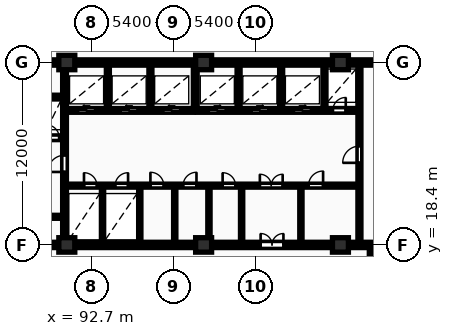
"""IFC4 building model, lengths in metres.
Left out: names, types, materials, properties, quantities, classifications, styles, units other than length and angle.
Written with IfcOpenShell. Run it as: python <this file> out.ifc"""

import sys

from ifc_helpers import new_model, si_unit, direction, frame, frame_2d, origin, origin_2d, place, context, subcontext, project, spatial, rectangle, extrude, element, fill, save


model = new_model("IFC4")
c1 = context("Model", 3, precision=1e-05, world=origin(), true_north=direction((0.0, 1.0)))
c2 = subcontext(c1, "Body", "Model", "MODEL_VIEW")
j1 = project(units=[si_unit("LENGTHUNIT", "METRE"), si_unit("PLANEANGLEUNIT", "RADIAN")], contexts=[c1])
p1 = place(None, origin())
s1 = spatial("IfcSite", under=j1, at=p1, CompositionType="ELEMENT")
p2 = place(p1, origin())
s2 = spatial("IfcBuilding", under=s1, at=p2, CompositionType="ELEMENT")
p3 = place(p2, origin())
s3 = spatial("IfcBuildingStorey", under=s2, at=p3, CompositionType="ELEMENT", Elevation=0.0)
for number, where, z_axis, x_axis in (
    (1, (91.1, 18.4, 0.0), (0.0, 0.0, 1.0), (1.0, 0.0, 0.0)),
    (2, (91.1, 30.4, 0.0), (0.0, 0.0, 1.0), (1.0, 0.0, 0.0)),
    (3, (100.1, 18.4, 0.0), (0.0, 0.0, 1.0), (1.0, 0.0, 0.0)),
    (4, (100.1, 30.4, 0.0), (0.0, 0.0, 1.0), (1.0, 0.0, 0.0)),
    (5, (109.1, 18.4, 0.0), (0.0, 0.0, 1.0), (1.0, 0.0, 0.0)),
    (6, (109.1, 30.4, 0.0), (0.0, 0.0, 1.0), (1.0, 0.0, 0.0)),
):
    element("IfcColumn", number, at=place(p3, frame(where, z_axis=z_axis, x_axis=x_axis)), inside=s3, PredefinedType="COLUMN", context=c2, shape_type="SweptSolid", body=[
        extrude(rectangle(XDim=1.05, YDim=0.95, at=origin_2d()), origin(), (0.0, 0.0, 1.0), 5.4),
    ])
p4 = place(p3, frame((81.925, 30.4, 0.0), z_axis=(0.0, 0.0, 1.0), x_axis=(1.0, 0.0, 0.0)))
e7 = element("IfcWall", 7, at=p4, inside=s3, PredefinedType="SHEAR", context=c2, shape_type="SweptSolid", body=[
    extrude(rectangle(XDim=36.265, YDim=0.35, at=frame_2d((18.132, 0.0))), origin(), (0.0, 0.0, 1.0), 5.4),
])
p5 = place(p3, frame((81.925, 18.4, 0.0), z_axis=(0.0, 0.0, 1.0), x_axis=(1.0, 0.0, 0.0)))
e8 = element("IfcWall", 8, at=p5, inside=s3, PredefinedType="SHEAR", context=c2, shape_type="SweptSolid", body=[
    extrude(rectangle(XDim=36.265, YDim=0.35, at=frame_2d((18.132, 0.0))), origin(), (0.0, 0.0, 1.0), 5.4),
])
p6 = place(p5, frame((5.675, 0.0, 0.0)))
e9 = element("IfcOpeningElement", 9, at=p6, cuts=e8, PredefinedType="OPENING", context=c2, shape_type="SweptSolid", body=[
    extrude(rectangle(XDim=1.0, YDim=2.15, at=frame_2d((0.5, 1.075))), frame((0.0, 0.185, 0.0), z_axis=(0.0, -1.0, 0.0), x_axis=(1.0, 0.0, 0.0)), (0.0, 0.0, 1.0), 0.37),
])
p7 = place(p5, frame((21.925, 0.0, 0.0)))
e10 = element("IfcOpeningElement", 10, at=p7, cuts=e8, PredefinedType="OPENING", context=c2, shape_type="SweptSolid", body=[
    extrude(rectangle(XDim=1.5, YDim=2.2, at=frame_2d((0.75, 1.1))), frame((0.0, 0.185, 0.0), z_axis=(0.0, -1.0, 0.0), x_axis=(1.0, 0.0, 0.0)), (0.0, 0.0, 1.0), 0.37),
])
p8 = place(p5, frame((29.875, 0.0, 0.0)))
e11 = element("IfcOpeningElement", 11, at=p8, cuts=e8, PredefinedType="OPENING", context=c2, shape_type="SweptSolid", body=[
    extrude(rectangle(XDim=1.0, YDim=2.15, at=frame_2d((0.5, 1.075))), frame((0.0, 0.185, 0.0), z_axis=(0.0, -1.0, 0.0), x_axis=(1.0, 0.0, 0.0)), (0.0, 0.0, 1.0), 0.37),
])
p9 = place(p3, frame((83.0, 28.125, 0.0), z_axis=(0.0, 0.0, 1.0), x_axis=(1.0, 0.0, 0.0)))
e12 = element("IfcWall", 12, at=p9, inside=s3, PredefinedType="SHEAR", context=c2, shape_type="SweptSolid", body=[
    extrude(rectangle(XDim=7.82, YDim=0.25, at=frame_2d((3.91, 0.0))), origin(), (0.0, 0.0, 1.0), 5.4),
])
p10 = place(p3, frame((86.5, 25.45, 0.0), z_axis=(0.0, 0.0, 1.0), x_axis=(1.0, 0.0, 0.0)))
e13 = element("IfcWall", 13, at=p10, inside=s3, PredefinedType="SHEAR", context=c2, shape_type="SweptSolid", body=[
    extrude(rectangle(XDim=4.32, YDim=0.25, at=frame_2d((2.16, 0.0))), origin(), (0.0, 0.0, 1.0), 5.4),
])
p11 = place(p10, frame((1.14, 0.0, 0.0)))
e14 = element("IfcOpeningElement", 14, at=p11, cuts=e13, PredefinedType="OPENING", context=c2, shape_type="SweptSolid", body=[
    extrude(rectangle(XDim=1.12, YDim=2.12, at=frame_2d((0.56, 1.06))), frame((0.0, 0.135, 0.0), z_axis=(0.0, -1.0, 0.0), x_axis=(1.0, 0.0, 0.0)), (0.0, 0.0, 1.0), 0.27),
])
p12 = place(p10, frame((3.25, 0.0, 0.0)))
e15 = element("IfcOpeningElement", 15, at=p12, cuts=e13, PredefinedType="OPENING", context=c2, shape_type="SweptSolid", body=[
    extrude(rectangle(XDim=0.85, YDim=2.05, at=frame_2d((0.425, 1.025))), frame((0.0, 0.135, 0.0), z_axis=(0.0, -1.0, 0.0), x_axis=(1.0, 0.0, 0.0)), (0.0, 0.0, 1.0), 0.27),
])
p13 = place(p3, frame((86.5, 20.25, 0.0), z_axis=(0.0, 0.0, 1.0), x_axis=(1.0, 0.0, 0.0)))
e16 = element("IfcWall", 16, at=p13, inside=s3, PredefinedType="PARTITIONING", context=c2, shape_type="SweptSolid", body=[
    extrude(rectangle(XDim=4.32, YDim=0.2, at=frame_2d((2.16, 0.0))), origin(), (0.0, 0.0, 1.0), 5.1),
])
p14 = place(p13, frame((1.4, 0.0, 0.0)))
e17 = element("IfcOpeningElement", 17, at=p14, cuts=e16, PredefinedType="OPENING", context=c2, shape_type="SweptSolid", body=[
    extrude(rectangle(XDim=1.1, YDim=2.1, at=frame_2d((0.55, 1.05))), frame((0.0, 0.11, 0.0), z_axis=(0.0, -1.0, 0.0), x_axis=(1.0, 0.0, 0.0)), (0.0, 0.0, 1.0), 0.22),
])
p15 = place(p3, frame((90.95, 18.6, 0.0), z_axis=(0.0, 0.0, 1.0), x_axis=(0.0, 1.0, 0.0)))
e18 = element("IfcWall", 18, at=p15, inside=s3, PredefinedType="SHEAR", context=c2, shape_type="SweptSolid", body=[
    extrude(rectangle(XDim=11.6, YDim=0.25, at=frame_2d((5.8, 0.0))), origin(), (0.0, 0.0, 1.0), 5.4),
])
p16 = place(p15, frame((4.6, 0.0, 0.0)))
e19 = element("IfcOpeningElement", 19, at=p16, cuts=e18, PredefinedType="OPENING", context=c2, shape_type="SweptSolid", body=[
    extrude(rectangle(XDim=1.1, YDim=2.1, at=frame_2d((0.55, 1.05))), frame((0.0, 0.135, 0.0), z_axis=(0.0, -1.0, 0.0), x_axis=(1.0, 0.0, 0.0)), (0.0, 0.0, 1.0), 0.27),
])
for number, where, z_axis, x_axis in (
    (20, (93.8, 27.38, 0.0), (0.0, 0.0, 1.0), (0.0, 1.0, 0.0)),
    (21, (96.6, 27.38, 0.0), (0.0, 0.0, 1.0), (0.0, 1.0, 0.0)),
):
    element("IfcWall", number, at=place(p3, frame(where, z_axis=z_axis, x_axis=x_axis)), inside=s3, PredefinedType="PARTITIONING", context=c2, shape_type="SweptSolid", body=[
        extrude(rectangle(XDim=2.82, YDim=0.2, at=frame_2d((1.41, 0.0))), origin(), (0.0, 0.0, 1.0), 5.1),
    ])
p17 = place(p3, frame((91.08, 27.25, 0.0), z_axis=(0.0, 0.0, 1.0), x_axis=(1.0, 0.0, 0.0)))
e22 = element("IfcWall", 22, at=p17, inside=s3, PredefinedType="SHEAR", context=c2, shape_type="SweptSolid", body=[
    extrude(rectangle(XDim=8.34, YDim=0.25, at=frame_2d((4.17, 0.0))), origin(), (0.0, 0.0, 1.0), 5.4),
])
p18 = place(p17, frame((0.76, 0.0, 0.0)))
e23 = element("IfcOpeningElement", 23, at=p18, cuts=e22, PredefinedType="OPENING", context=c2, shape_type="SweptSolid", body=[
    extrude(rectangle(XDim=1.12, YDim=2.12, at=frame_2d((0.56, 1.06))), frame((0.0, 0.135, 0.0), z_axis=(0.0, -1.0, 0.0), x_axis=(1.0, 0.0, 0.0)), (0.0, 0.0, 1.0), 0.27),
])
p19 = place(p17, frame((3.56, 0.0, 0.0)))
e24 = element("IfcOpeningElement", 24, at=p19, cuts=e22, PredefinedType="OPENING", context=c2, shape_type="SweptSolid", body=[
    extrude(rectangle(XDim=1.12, YDim=2.12, at=frame_2d((0.56, 1.06))), frame((0.0, 0.135, 0.0), z_axis=(0.0, -1.0, 0.0), x_axis=(1.0, 0.0, 0.0)), (0.0, 0.0, 1.0), 0.27),
])
p20 = place(p17, frame((6.36, 0.0, 0.0)))
e25 = element("IfcOpeningElement", 25, at=p20, cuts=e22, PredefinedType="OPENING", context=c2, shape_type="SweptSolid", body=[
    extrude(rectangle(XDim=1.12, YDim=2.12, at=frame_2d((0.56, 1.06))), frame((0.0, 0.135, 0.0), z_axis=(0.0, -1.0, 0.0), x_axis=(1.0, 0.0, 0.0)), (0.0, 0.0, 1.0), 0.27),
])
p21 = place(p3, frame((99.55, 27.25, 0.0), z_axis=(0.0, 0.0, 1.0), x_axis=(0.0, 1.0, 0.0)))
e26 = element("IfcWall", 26, at=p21, inside=s3, PredefinedType="SHEAR", context=c2, shape_type="SweptSolid", body=[
    extrude(rectangle(XDim=2.95, YDim=0.25, at=frame_2d((1.475, 0.0))), origin(), (0.0, 0.0, 1.0), 5.4),
])
for number, where, z_axis, x_axis in (
    (27, (102.4, 27.38, 0.0), (0.0, 0.0, 1.0), (0.0, 1.0, 0.0)),
    (28, (105.2, 27.38, 0.0), (0.0, 0.0, 1.0), (0.0, 1.0, 0.0)),
    (29, (108.05, 27.38, 0.0), (0.0, 0.0, 1.0), (0.0, 1.0, 0.0)),
):
    element("IfcWall", number, at=place(p3, frame(where, z_axis=z_axis, x_axis=x_axis)), inside=s3, PredefinedType="PARTITIONING", context=c2, shape_type="SweptSolid", body=[
        extrude(rectangle(XDim=2.82, YDim=0.2, at=frame_2d((1.41, 0.0))), origin(), (0.0, 0.0, 1.0), 5.1),
    ])
p22 = place(p3, frame((99.68, 27.25, 0.0), z_axis=(0.0, 0.0, 1.0), x_axis=(1.0, 0.0, 0.0)))
e30 = element("IfcWall", 30, at=p22, inside=s3, PredefinedType="SHEAR", context=c2, shape_type="SweptSolid", body=[
    extrude(rectangle(XDim=10.54, YDim=0.25, at=frame_2d((5.27, 0.0))), origin(), (0.0, 0.0, 1.0), 5.4),
])
p23 = place(p22, frame((0.76, 0.0, 0.0)))
e31 = element("IfcOpeningElement", 31, at=p23, cuts=e30, PredefinedType="OPENING", context=c2, shape_type="SweptSolid", body=[
    extrude(rectangle(XDim=1.12, YDim=2.12, at=frame_2d((0.56, 1.06))), frame((0.0, 0.135, 0.0), z_axis=(0.0, -1.0, 0.0), x_axis=(1.0, 0.0, 0.0)), (0.0, 0.0, 1.0), 0.27),
])
p24 = place(p22, frame((3.56, 0.0, 0.0)))
e32 = element("IfcOpeningElement", 32, at=p24, cuts=e30, PredefinedType="OPENING", context=c2, shape_type="SweptSolid", body=[
    extrude(rectangle(XDim=1.12, YDim=2.12, at=frame_2d((0.56, 1.06))), frame((0.0, 0.135, 0.0), z_axis=(0.0, -1.0, 0.0), x_axis=(1.0, 0.0, 0.0)), (0.0, 0.0, 1.0), 0.27),
])
p25 = place(p22, frame((6.36, 0.0, 0.0)))
e33 = element("IfcOpeningElement", 33, at=p25, cuts=e30, PredefinedType="OPENING", context=c2, shape_type="SweptSolid", body=[
    extrude(rectangle(XDim=1.12, YDim=2.12, at=frame_2d((0.56, 1.06))), frame((0.0, 0.135, 0.0), z_axis=(0.0, -1.0, 0.0), x_axis=(1.0, 0.0, 0.0)), (0.0, 0.0, 1.0), 0.27),
])
p26 = place(p22, frame((8.92, 0.0, 0.0)))
e34 = element("IfcOpeningElement", 34, at=p26, cuts=e30, PredefinedType="OPENING", context=c2, shape_type="SweptSolid", body=[
    extrude(rectangle(XDim=0.85, YDim=2.05, at=frame_2d((0.425, 1.025))), frame((0.0, 0.135, 0.0), z_axis=(0.0, -1.0, 0.0), x_axis=(1.0, 0.0, 0.0)), (0.0, 0.0, 1.0), 0.27),
])
for number, where, z_axis, x_axis in (
    (35, (93.45, 18.6, 0.0), (0.0, 0.0, 1.0), (0.0, 1.0, 0.0)),
    (36, (95.9, 18.6, 0.0), (0.0, 0.0, 1.0), (0.0, 1.0, 0.0)),
    (37, (98.2, 18.6, 0.0), (0.0, 0.0, 1.0), (0.0, 1.0, 0.0)),
):
    element("IfcWall", number, at=place(p3, frame(where, z_axis=z_axis, x_axis=x_axis)), inside=s3, PredefinedType="PARTITIONING", context=c2, shape_type="SweptSolid", body=[
        extrude(rectangle(XDim=3.6, YDim=0.15, at=frame_2d((1.8, 0.0))), origin(), (0.0, 0.0, 1.0), 5.1),
    ])
p27 = place(p3, frame((100.45, 18.6, 0.0), z_axis=(0.0, 0.0, 1.0), x_axis=(0.0, 1.0, 0.0)))
e38 = element("IfcWall", 38, at=p27, inside=s3, PredefinedType="PARTITIONING", context=c2, shape_type="SweptSolid", body=[
    extrude(rectangle(XDim=3.6, YDim=0.15, at=frame_2d((1.8, 0.0))), origin(), (0.0, 0.0, 1.0), 4.35),
])
for number, where, z_axis, x_axis in (
    (39, (102.6, 18.6, 0.0), (0.0, 0.0, 1.0), (0.0, 1.0, 0.0)),
    (40, (106.5, 18.6, 0.0), (0.0, 0.0, 1.0), (0.0, 1.0, 0.0)),
):
    element("IfcWall", number, at=place(p3, frame(where, z_axis=z_axis, x_axis=x_axis)), inside=s3, PredefinedType="PARTITIONING", context=c2, shape_type="SweptSolid", body=[
        extrude(rectangle(XDim=3.6, YDim=0.15, at=frame_2d((1.8, 0.0))), origin(), (0.0, 0.0, 1.0), 5.1),
    ])
p28 = place(p3, frame((91.08, 22.3, 0.0), z_axis=(0.0, 0.0, 1.0), x_axis=(1.0, 0.0, 0.0)))
e41 = element("IfcWall", 41, at=p28, inside=s3, PredefinedType="PARTITIONING", context=c2, shape_type="SweptSolid", body=[
    extrude(rectangle(XDim=19.14, YDim=0.2, at=frame_2d((9.57, 0.0))), origin(), (0.0, 0.0, 1.0), 5.1),
])
p29 = place(p28, frame((1.15, 0.0, 0.0)))
e42 = element("IfcOpeningElement", 42, at=p29, cuts=e41, PredefinedType="OPENING", context=c2, shape_type="SweptSolid", body=[
    extrude(rectangle(XDim=0.85, YDim=2.05, at=frame_2d((0.425, 1.025))), frame((0.0, 0.11, 0.0), z_axis=(0.0, -1.0, 0.0), x_axis=(1.0, 0.0, 0.0)), (0.0, 0.0, 1.0), 0.22),
])
p30 = place(p28, frame((3.2, 0.0, 0.0)))
e43 = element("IfcOpeningElement", 43, at=p30, cuts=e41, PredefinedType="OPENING", context=c2, shape_type="SweptSolid", body=[
    extrude(rectangle(XDim=0.85, YDim=2.05, at=frame_2d((0.425, 1.025))), frame((0.0, 0.11, 0.0), z_axis=(0.0, -1.0, 0.0), x_axis=(1.0, 0.0, 0.0)), (0.0, 0.0, 1.0), 0.22),
])
p31 = place(p28, frame((12.72, 0.0, 0.0)))
e44 = element("IfcOpeningElement", 44, at=p31, cuts=e41, PredefinedType="OPENING", context=c2, shape_type="SweptSolid", body=[
    extrude(rectangle(XDim=1.5, YDim=2.2, at=frame_2d((0.75, 1.1))), frame((0.0, 0.11, 0.0), z_axis=(0.0, -1.0, 0.0), x_axis=(1.0, 0.0, 0.0)), (0.0, 0.0, 1.0), 0.22),
])
p32 = place(p28, frame((5.52, 0.0, 0.0)))
e45 = element("IfcOpeningElement", 45, at=p32, cuts=e41, PredefinedType="OPENING", context=c2, shape_type="SweptSolid", body=[
    extrude(rectangle(XDim=0.88, YDim=2.06, at=frame_2d((0.44, 1.03))), frame((0.0, 0.11, 0.0), z_axis=(0.0, -1.0, 0.0), x_axis=(1.0, 0.0, 0.0)), (0.0, 0.0, 1.0), 0.22),
])
p33 = place(p28, frame((7.67, 0.0, 0.0)))
e46 = element("IfcOpeningElement", 46, at=p33, cuts=e41, PredefinedType="OPENING", context=c2, shape_type="SweptSolid", body=[
    extrude(rectangle(XDim=0.88, YDim=2.06, at=frame_2d((0.44, 1.03))), frame((0.0, 0.11, 0.0), z_axis=(0.0, -1.0, 0.0), x_axis=(1.0, 0.0, 0.0)), (0.0, 0.0, 1.0), 0.22),
])
p34 = place(p28, frame((10.27, 0.0, 0.0)))
e47 = element("IfcOpeningElement", 47, at=p34, cuts=e41, PredefinedType="OPENING", context=c2, shape_type="SweptSolid", body=[
    extrude(rectangle(XDim=0.85, YDim=2.05, at=frame_2d((0.425, 1.025))), frame((0.0, 0.11, 0.0), z_axis=(0.0, -1.0, 0.0), x_axis=(1.0, 0.0, 0.0)), (0.0, 0.0, 1.0), 0.22),
])
p35 = place(p28, frame((15.92, 0.0, 0.0)))
e48 = element("IfcOpeningElement", 48, at=p35, cuts=e41, PredefinedType="OPENING", context=c2, shape_type="SweptSolid", body=[
    extrude(rectangle(XDim=0.96, YDim=2.1, at=frame_2d((0.48, 1.05))), frame((0.0, 0.11, 0.0), z_axis=(0.0, -1.0, 0.0), x_axis=(1.0, 0.0, 0.0)), (0.0, 0.0, 1.0), 0.22),
])
p36 = place(p3, frame((110.35, 18.6, 0.0), z_axis=(0.0, 0.0, 1.0), x_axis=(0.0, 1.0, 0.0)))
e49 = element("IfcWall", 49, at=p36, inside=s3, PredefinedType="PARTITIONING", context=c2, shape_type="SweptSolid", body=[
    extrude(rectangle(XDim=11.6, YDim=0.2, at=frame_2d((5.8, 0.0))), origin(), (0.0, 0.0, 1.0), 5.1),
])
p37 = place(p36, frame((5.2, 0.0, 0.0)))
e50 = element("IfcOpeningElement", 50, at=p37, cuts=e49, PredefinedType="OPENING", context=c2, shape_type="SweptSolid", body=[
    extrude(rectangle(XDim=1.1, YDim=2.15, at=frame_2d((0.55, 1.075))), frame((0.0, 0.11, 0.0), z_axis=(0.0, -1.0, 0.0), x_axis=(1.0, 0.0, 0.0)), (0.0, 0.0, 1.0), 0.22),
])
p38 = place(p3, frame((111.1, -26.2, 0.0), z_axis=(0.0, 0.0, 1.0), x_axis=(0.0, 1.0, 0.0)))
e51 = element("IfcWall", 51, at=p38, inside=s3, PredefinedType="PARTITIONING", context=c2, shape_type="SweptSolid", body=[
    extrude(rectangle(XDim=44.35, YDim=0.2, at=frame_2d((22.175, 0.0))), origin(), (0.0, 0.0, 1.0), 5.1),
])
p39 = place(p38, frame((16.0, 0.0, 0.0)))
e52 = element("IfcOpeningElement", 52, at=p39, cuts=e51, PredefinedType="OPENING", context=c2, shape_type="SweptSolid", body=[
    extrude(rectangle(XDim=1.1, YDim=2.1, at=frame_2d((0.55, 1.05))), frame((0.0, 0.11, 0.0), z_axis=(0.0, -1.0, 0.0), x_axis=(1.0, 0.0, 0.0)), (0.0, 0.0, 1.0), 0.22),
])
p40 = place(p7, origin())
e53 = element("IfcDoor", 53, at=p40, inside=s3, OperationType="DOUBLE_DOOR_SINGLE_SWING", PredefinedType="DOOR", context=c2, shape_type="SweptSolid", body=[
    extrude(rectangle(XDim=1.5, YDim=2.2, at=frame_2d((0.75, 1.1))), frame((0.0, 0.025, 0.0), z_axis=(0.0, -1.0, 0.0), x_axis=(1.0, 0.0, 0.0)), (0.0, 0.0, 1.0), 0.05),
])
fill(e10, e53)
p41 = place(p12, origin())
e54 = element("IfcDoor", 54, at=p41, inside=s3, OperationType="SINGLE_SWING_LEFT", PredefinedType="DOOR", context=c2, shape_type="SweptSolid", body=[
    extrude(rectangle(XDim=0.85, YDim=2.05, at=frame_2d((0.425, 1.025))), frame((0.0, 0.025, 0.0), z_axis=(0.0, -1.0, 0.0), x_axis=(1.0, 0.0, 0.0)), (0.0, 0.0, 1.0), 0.05),
])
fill(e15, e54)
p42 = place(p16, origin())
e55 = element("IfcDoor", 55, at=p42, inside=s3, OperationType="SINGLE_SWING_LEFT", PredefinedType="DOOR", context=c2, shape_type="SweptSolid", body=[
    extrude(rectangle(XDim=1.1, YDim=2.1, at=frame_2d((0.55, 1.05))), frame((0.0, 0.025, 0.0), z_axis=(0.0, -1.0, 0.0), x_axis=(1.0, 0.0, 0.0)), (0.0, 0.0, 1.0), 0.05),
])
fill(e19, e55)
p43 = place(p18, origin())
e56 = element("IfcDoor", 56, at=p43, inside=s3, OperationType="SLIDING_TO_LEFT", PredefinedType="DOOR", context=c2, shape_type="SweptSolid", body=[
    extrude(rectangle(XDim=1.12, YDim=2.12, at=frame_2d((0.56, 1.06))), frame((0.0, 0.025, 0.0), z_axis=(0.0, -1.0, 0.0), x_axis=(1.0, 0.0, 0.0)), (0.0, 0.0, 1.0), 0.05),
])
fill(e23, e56)
p44 = place(p19, origin())
e57 = element("IfcDoor", 57, at=p44, inside=s3, OperationType="SLIDING_TO_LEFT", PredefinedType="DOOR", context=c2, shape_type="SweptSolid", body=[
    extrude(rectangle(XDim=1.12, YDim=2.12, at=frame_2d((0.56, 1.06))), frame((0.0, 0.025, 0.0), z_axis=(0.0, -1.0, 0.0), x_axis=(1.0, 0.0, 0.0)), (0.0, 0.0, 1.0), 0.05),
])
fill(e24, e57)
p45 = place(p20, origin())
e58 = element("IfcDoor", 58, at=p45, inside=s3, OperationType="SLIDING_TO_LEFT", PredefinedType="DOOR", context=c2, shape_type="SweptSolid", body=[
    extrude(rectangle(XDim=1.12, YDim=2.12, at=frame_2d((0.56, 1.06))), frame((0.0, 0.025, 0.0), z_axis=(0.0, -1.0, 0.0), x_axis=(1.0, 0.0, 0.0)), (0.0, 0.0, 1.0), 0.05),
])
fill(e25, e58)
p46 = place(p23, origin())
e59 = element("IfcDoor", 59, at=p46, inside=s3, OperationType="SLIDING_TO_RIGHT", PredefinedType="DOOR", context=c2, shape_type="SweptSolid", body=[
    extrude(rectangle(XDim=1.12, YDim=2.12, at=frame_2d((0.56, 1.06))), frame((0.0, 0.025, 0.0), z_axis=(0.0, -1.0, 0.0), x_axis=(1.0, 0.0, 0.0)), (0.0, 0.0, 1.0), 0.05),
])
fill(e31, e59)
p47 = place(p24, origin())
e60 = element("IfcDoor", 60, at=p47, inside=s3, OperationType="SLIDING_TO_RIGHT", PredefinedType="DOOR", context=c2, shape_type="SweptSolid", body=[
    extrude(rectangle(XDim=1.12, YDim=2.12, at=frame_2d((0.56, 1.06))), frame((0.0, 0.025, 0.0), z_axis=(0.0, -1.0, 0.0), x_axis=(1.0, 0.0, 0.0)), (0.0, 0.0, 1.0), 0.05),
])
fill(e32, e60)
p48 = place(p25, origin())
e61 = element("IfcDoor", 61, at=p48, inside=s3, OperationType="SLIDING_TO_RIGHT", PredefinedType="DOOR", context=c2, shape_type="SweptSolid", body=[
    extrude(rectangle(XDim=1.12, YDim=2.12, at=frame_2d((0.56, 1.06))), frame((0.0, 0.025, 0.0), z_axis=(0.0, -1.0, 0.0), x_axis=(1.0, 0.0, 0.0)), (0.0, 0.0, 1.0), 0.05),
])
fill(e33, e61)
p49 = place(p26, origin())
e62 = element("IfcDoor", 62, at=p49, inside=s3, OperationType="SINGLE_SWING_RIGHT", PredefinedType="DOOR", context=c2, shape_type="SweptSolid", body=[
    extrude(rectangle(XDim=0.85, YDim=2.05, at=frame_2d((0.425, 1.025))), frame((0.0, 0.025, 0.0), z_axis=(0.0, -1.0, 0.0), x_axis=(1.0, 0.0, 0.0)), (0.0, 0.0, 1.0), 0.05),
])
fill(e34, e62)
p50 = place(p29, origin())
e63 = element("IfcDoor", 63, at=p50, inside=s3, OperationType="SINGLE_SWING_LEFT", PredefinedType="DOOR", context=c2, shape_type="SweptSolid", body=[
    extrude(rectangle(XDim=0.85, YDim=2.05, at=frame_2d((0.425, 1.025))), frame((0.0, 0.025, 0.0), z_axis=(0.0, -1.0, 0.0), x_axis=(1.0, 0.0, 0.0)), (0.0, 0.0, 1.0), 0.05),
])
fill(e42, e63)
p51 = place(p30, origin())
e64 = element("IfcDoor", 64, at=p51, inside=s3, OperationType="SINGLE_SWING_RIGHT", PredefinedType="DOOR", context=c2, shape_type="SweptSolid", body=[
    extrude(rectangle(XDim=0.85, YDim=2.05, at=frame_2d((0.425, 1.025))), frame((0.0, 0.025, 0.0), z_axis=(0.0, -1.0, 0.0), x_axis=(1.0, 0.0, 0.0)), (0.0, 0.0, 1.0), 0.05),
])
fill(e43, e64)
p52 = place(p31, origin())
e65 = element("IfcDoor", 65, at=p52, inside=s3, OperationType="DOUBLE_DOOR_SINGLE_SWING", PredefinedType="DOOR", context=c2, shape_type="SweptSolid", body=[
    extrude(rectangle(XDim=1.5, YDim=2.2, at=frame_2d((0.75, 1.1))), frame((0.0, 0.025, 0.0), z_axis=(0.0, -1.0, 0.0), x_axis=(1.0, 0.0, 0.0)), (0.0, 0.0, 1.0), 0.05),
])
fill(e44, e65)
p53 = place(p32, origin())
e66 = element("IfcDoor", 66, at=p53, inside=s3, OperationType="SINGLE_SWING_LEFT", PredefinedType="DOOR", context=c2, shape_type="SweptSolid", body=[
    extrude(rectangle(XDim=0.88, YDim=2.06, at=frame_2d((0.44, 1.03))), frame((0.0, 0.025, 0.0), z_axis=(0.0, -1.0, 0.0), x_axis=(1.0, 0.0, 0.0)), (0.0, 0.0, 1.0), 0.05),
])
fill(e45, e66)
p54 = place(p33, origin())
e67 = element("IfcDoor", 67, at=p54, inside=s3, OperationType="SINGLE_SWING_RIGHT", PredefinedType="DOOR", context=c2, shape_type="SweptSolid", body=[
    extrude(rectangle(XDim=0.88, YDim=2.06, at=frame_2d((0.44, 1.03))), frame((0.0, 0.025, 0.0), z_axis=(0.0, -1.0, 0.0), x_axis=(1.0, 0.0, 0.0)), (0.0, 0.0, 1.0), 0.05),
])
fill(e46, e67)
p55 = place(p34, origin())
e68 = element("IfcDoor", 68, at=p55, inside=s3, OperationType="SINGLE_SWING_LEFT", PredefinedType="DOOR", context=c2, shape_type="SweptSolid", body=[
    extrude(rectangle(XDim=0.85, YDim=2.05, at=frame_2d((0.425, 1.025))), frame((0.0, 0.025, 0.0), z_axis=(0.0, -1.0, 0.0), x_axis=(1.0, 0.0, 0.0)), (0.0, 0.0, 1.0), 0.05),
])
fill(e47, e68)
p56 = place(p35, origin())
e69 = element("IfcDoor", 69, at=p56, inside=s3, OperationType="SINGLE_SWING_RIGHT", PredefinedType="DOOR", context=c2, shape_type="SweptSolid", body=[
    extrude(rectangle(XDim=0.96, YDim=2.1, at=frame_2d((0.48, 1.05))), frame((0.0, 0.025, 0.0), z_axis=(0.0, -1.0, 0.0), x_axis=(1.0, 0.0, 0.0)), (0.0, 0.0, 1.0), 0.05),
])
fill(e48, e69)
p57 = place(p37, origin())
e70 = element("IfcDoor", 70, at=p57, inside=s3, OperationType="SINGLE_SWING_LEFT", PredefinedType="DOOR", context=c2, shape_type="SweptSolid", body=[
    extrude(rectangle(XDim=1.1, YDim=2.15, at=frame_2d((0.55, 1.075))), frame((0.0, 0.025, 0.0), z_axis=(0.0, -1.0, 0.0), x_axis=(1.0, 0.0, 0.0)), (0.0, 0.0, 1.0), 0.05),
])
fill(e50, e70)
save(model, sys.argv[1])
